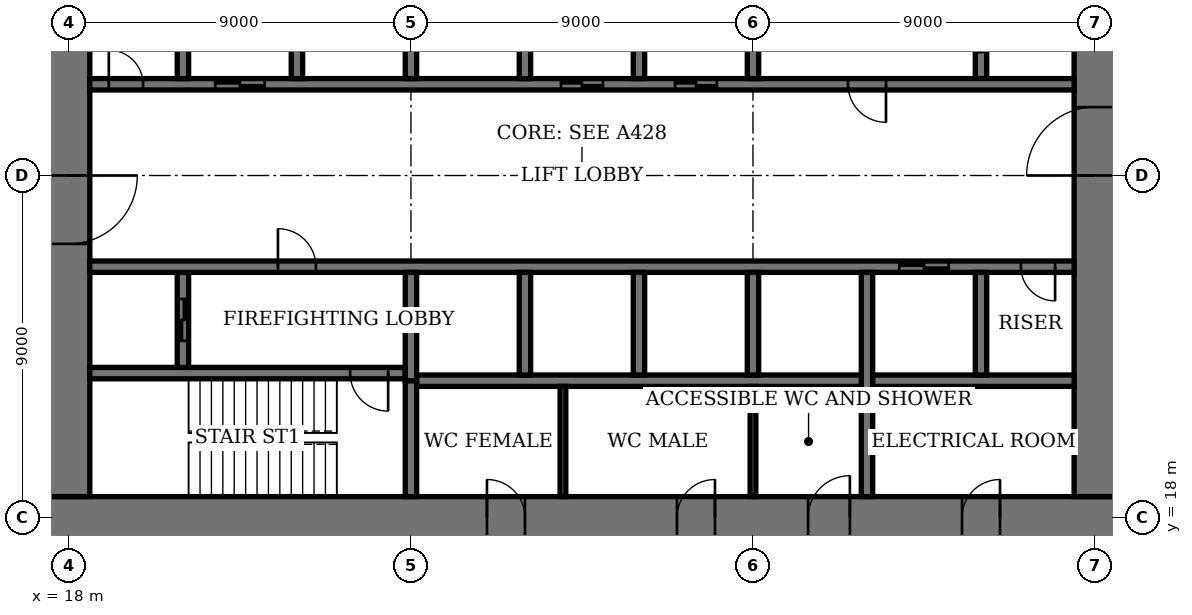
"""IFC4 building model, lengths in metres.
Left out: names, types, materials, properties, quantities, classifications, styles, units other than length and angle.
Written with IfcOpenShell. Run it as: python <this file> out.ifc"""

import sys

from ifc_helpers import new_model, si_unit, direction, frame, frame_2d, origin, place, context, subcontext, project, spatial, rectangle, extrude, element, fill, save


model = new_model("IFC4")
c1 = context("Model", 3, precision=1e-05, world=origin(), true_north=direction((0.0, 1.0)))
c2 = subcontext(c1, "Body", "Model", "MODEL_VIEW")
j1 = project(units=[si_unit("LENGTHUNIT", "METRE"), si_unit("PLANEANGLEUNIT", "RADIAN")], contexts=[c1])
p1 = place(None, origin())
s1 = spatial("IfcSite", under=j1, at=p1, CompositionType="ELEMENT")
p2 = place(p1, origin())
s2 = spatial("IfcBuilding", under=s1, at=p2, CompositionType="ELEMENT")
p3 = place(p2, frame((0.0, 0.0, 89.0)))
s3 = spatial("IfcBuildingStorey", under=s2, at=p3, CompositionType="ELEMENT", Elevation=89.0)
p4 = place(p3, frame((17.45, 18.0, 0.0), z_axis=(0.0, 0.0, 1.0), x_axis=(1.0, 0.0, 0.0)))
e1 = element("IfcWall", 1, at=p4, inside=s3, PredefinedType="SHEAR", context=c2, shape_type="SweptSolid", body=[
    extrude(rectangle(XDim=28.1, YDim=1.1, at=frame_2d((14.05, 0.0))), origin(), (0.0, 0.0, 1.0), 4.0),
])
p5 = place(p4, frame((11.55, 0.0, 0.0)))
e2 = element("IfcOpeningElement", 2, at=p5, cuts=e1, PredefinedType="OPENING", context=c2, shape_type="SweptSolid", body=[
    extrude(rectangle(XDim=1.0, YDim=2.4, at=frame_2d((0.5, 1.2))), frame((0.0, 0.56, 0.0), z_axis=(0.0, -1.0, 0.0), x_axis=(1.0, 0.0, 0.0)), (0.0, 0.0, 1.0), 1.12),
])
p6 = place(p4, frame((16.55, 0.0, 0.0)))
e3 = element("IfcOpeningElement", 3, at=p6, cuts=e1, PredefinedType="OPENING", context=c2, shape_type="SweptSolid", body=[
    extrude(rectangle(XDim=1.0, YDim=2.4, at=frame_2d((0.5, 1.2))), frame((0.0, 0.56, 0.0), z_axis=(0.0, -1.0, 0.0), x_axis=(1.0, 0.0, 0.0)), (0.0, 0.0, 1.0), 1.12),
])
p7 = place(p4, frame((20.0, 0.0, 0.0)))
e4 = element("IfcOpeningElement", 4, at=p7, cuts=e1, PredefinedType="OPENING", context=c2, shape_type="SweptSolid", body=[
    extrude(rectangle(XDim=1.1, YDim=2.4, at=frame_2d((0.55, 1.2))), frame((0.0, 0.56, 0.0), z_axis=(0.0, -1.0, 0.0), x_axis=(1.0, 0.0, 0.0)), (0.0, 0.0, 1.0), 1.12),
])
p8 = place(p4, frame((24.05, 0.0, 0.0)))
e5 = element("IfcOpeningElement", 5, at=p8, cuts=e1, PredefinedType="OPENING", context=c2, shape_type="SweptSolid", body=[
    extrude(rectangle(XDim=1.0, YDim=2.4, at=frame_2d((0.5, 1.2))), frame((0.0, 0.56, 0.0), z_axis=(0.0, -1.0, 0.0), x_axis=(1.0, 0.0, 0.0)), (0.0, 0.0, 1.0), 1.12),
])
p9 = place(p3, frame((18.0, 35.45, 0.0), z_axis=(0.0, 0.0, 1.0), x_axis=(0.0, -1.0, 0.0)))
e6 = element("IfcWall", 6, at=p9, inside=s3, PredefinedType="SHEAR", context=c2, shape_type="SweptSolid", body=[
    extrude(rectangle(XDim=16.9, YDim=1.1, at=frame_2d((8.45, 0.0))), origin(), (0.0, 0.0, 1.0), 4.0),
])
p10 = place(p9, frame((8.45, 0.0, 0.0)))
e7 = element("IfcOpeningElement", 7, at=p10, cuts=e6, PredefinedType="OPENING", context=c2, shape_type="SweptSolid", body=[
    extrude(rectangle(XDim=1.8, YDim=2.4, at=frame_2d((0.9, 1.2))), frame((0.0, 0.56, 0.0), z_axis=(0.0, -1.0, 0.0), x_axis=(1.0, 0.0, 0.0)), (0.0, 0.0, 1.0), 1.12),
])
p11 = place(p3, frame((45.0, 18.55, 0.0), z_axis=(0.0, 0.0, 1.0), x_axis=(0.0, 1.0, 0.0)))
e8 = element("IfcWall", 8, at=p11, inside=s3, PredefinedType="SHEAR", context=c2, shape_type="SweptSolid", body=[
    extrude(rectangle(XDim=16.9, YDim=1.1, at=frame_2d((8.45, 0.0))), origin(), (0.0, 0.0, 1.0), 4.0),
])
p12 = place(p11, frame((8.45, 0.0, 0.0)))
e9 = element("IfcOpeningElement", 9, at=p12, cuts=e8, PredefinedType="OPENING", context=c2, shape_type="SweptSolid", body=[
    extrude(rectangle(XDim=1.8, YDim=2.4, at=frame_2d((0.9, 1.2))), frame((0.0, 0.56, 0.0), z_axis=(0.0, -1.0, 0.0), x_axis=(1.0, 0.0, 0.0)), (0.0, 0.0, 1.0), 1.12),
])
p13 = place(p3, frame((18.55, 21.8, 0.0), z_axis=(0.0, 0.0, 1.0), x_axis=(1.0, 0.0, 0.0)))
e10 = element("IfcWall", 10, at=p13, inside=s3, PredefinedType="SHEAR", context=c2, shape_type="SweptSolid", body=[
    extrude(rectangle(XDim=8.3, YDim=0.3, at=frame_2d((4.15, 0.0))), origin(), (0.0, 0.0, 1.0), 4.0),
])
p14 = place(p13, frame((6.85, 0.0, 0.0)))
e11 = element("IfcOpeningElement", 11, at=p14, cuts=e10, PredefinedType="OPENING", context=c2, shape_type="SweptSolid", body=[
    extrude(rectangle(XDim=1.0, YDim=2.4, at=frame_2d((0.5, 1.2))), frame((0.0, 0.16, 0.0), z_axis=(0.0, -1.0, 0.0), x_axis=(1.0, 0.0, 0.0)), (0.0, 0.0, 1.0), 0.32),
])
p15 = place(p3, frame((27.0, 18.55, 0.0), z_axis=(0.0, 0.0, 1.0), x_axis=(0.0, 1.0, 0.0)))
e12 = element("IfcWall", 12, at=p15, inside=s3, PredefinedType="SHEAR", context=c2, shape_type="SweptSolid", body=[
    extrude(rectangle(XDim=3.05, YDim=0.3, at=frame_2d((1.525, 0.0))), origin(), (0.0, 0.0, 1.0), 4.0),
])
p16 = place(p3, frame((21.0, 21.95, 0.0), z_axis=(0.0, 0.0, 1.0), x_axis=(0.0, 1.0, 0.0)))
e13 = element("IfcWall", 13, at=p16, inside=s3, PredefinedType="SHEAR", context=c2, shape_type="SweptSolid", body=[
    extrude(rectangle(XDim=2.5, YDim=0.3, at=frame_2d((1.25, 0.0))), origin(), (0.0, 0.0, 1.0), 4.0),
])
p17 = place(p16, frame((0.7, 0.0, 0.0)))
e14 = element("IfcOpeningElement", 14, at=p17, cuts=e13, PredefinedType="OPENING", context=c2, shape_type="SweptSolid", body=[
    extrude(rectangle(XDim=1.1, YDim=2.4, at=frame_2d((0.55, 1.2))), frame((0.0, 0.16, 0.0), z_axis=(0.0, -1.0, 0.0), x_axis=(1.0, 0.0, 0.0)), (0.0, 0.0, 1.0), 0.32),
])
p18 = place(p3, frame((42.0, 29.55, 0.0), z_axis=(0.0, 0.0, 1.0), x_axis=(0.0, 1.0, 0.0)))
e15 = element("IfcWall", 15, at=p18, inside=s3, PredefinedType="SHEAR", context=c2, shape_type="SweptSolid", body=[
    extrude(rectangle(XDim=2.5, YDim=0.3, at=frame_2d((1.25, 0.0))), origin(), (0.0, 0.0, 1.0), 4.0),
])
p19 = place(p18, frame((0.7, 0.0, 0.0)))
e16 = element("IfcOpeningElement", 16, at=p19, cuts=e15, PredefinedType="OPENING", context=c2, shape_type="SweptSolid", body=[
    extrude(rectangle(XDim=1.1, YDim=2.4, at=frame_2d((0.55, 1.2))), frame((0.0, 0.16, 0.0), z_axis=(0.0, -1.0, 0.0), x_axis=(1.0, 0.0, 0.0)), (0.0, 0.0, 1.0), 0.32),
])
p20 = place(p3, frame((18.55, 24.6, 0.0), z_axis=(0.0, 0.0, 1.0), x_axis=(1.0, 0.0, 0.0)))
e17 = element("IfcWall", 17, at=p20, inside=s3, PredefinedType="SHEAR", context=c2, shape_type="SweptSolid", body=[
    extrude(rectangle(XDim=25.9, YDim=0.3, at=frame_2d((12.95, 0.0))), origin(), (0.0, 0.0, 1.0), 4.0),
])
p21 = place(p20, frame((4.95, 0.0, 0.0)))
e18 = element("IfcOpeningElement", 18, at=p21, cuts=e17, PredefinedType="OPENING", context=c2, shape_type="SweptSolid", body=[
    extrude(rectangle(XDim=1.0, YDim=2.4, at=frame_2d((0.5, 1.2))), frame((0.0, 0.16, 0.0), z_axis=(0.0, -1.0, 0.0), x_axis=(1.0, 0.0, 0.0)), (0.0, 0.0, 1.0), 0.32),
])
p22 = place(p20, frame((24.5, 0.0, 0.0)))
e19 = element("IfcOpeningElement", 19, at=p22, cuts=e17, PredefinedType="OPENING", context=c2, shape_type="SweptSolid", body=[
    extrude(rectangle(XDim=0.9, YDim=2.1, at=frame_2d((0.45, 1.05))), frame((0.0, 0.16, 0.0), z_axis=(0.0, -1.0, 0.0), x_axis=(1.0, 0.0, 0.0)), (0.0, 0.0, 1.0), 0.32),
])
p23 = place(p20, frame((21.3, 0.0, 0.0)))
e20 = element("IfcOpeningElement", 20, at=p23, cuts=e17, PredefinedType="OPENING", context=c2, shape_type="SweptSolid", body=[
    extrude(rectangle(XDim=1.3, YDim=2.4, at=frame_2d((0.65, 1.2))), frame((0.0, 0.16, 0.0), z_axis=(0.0, -1.0, 0.0), x_axis=(1.0, 0.0, 0.0)), (0.0, 0.0, 1.0), 0.32),
])
p24 = place(p3, frame((18.55, 29.4, 0.0), z_axis=(0.0, 0.0, 1.0), x_axis=(1.0, 0.0, 0.0)))
e21 = element("IfcWall", 21, at=p24, inside=s3, PredefinedType="SHEAR", context=c2, shape_type="SweptSolid", body=[
    extrude(rectangle(XDim=25.9, YDim=0.3, at=frame_2d((12.95, 0.0))), origin(), (0.0, 0.0, 1.0), 4.0),
])
p25 = place(p24, frame((19.95, 0.0, 0.0)))
e22 = element("IfcOpeningElement", 22, at=p25, cuts=e21, PredefinedType="OPENING", context=c2, shape_type="SweptSolid", body=[
    extrude(rectangle(XDim=1.0, YDim=2.4, at=frame_2d((0.5, 1.2))), frame((0.0, 0.16, 0.0), z_axis=(0.0, -1.0, 0.0), x_axis=(1.0, 0.0, 0.0)), (0.0, 0.0, 1.0), 0.32),
])
p26 = place(p24, frame((0.5, 0.0, 0.0)))
e23 = element("IfcOpeningElement", 23, at=p26, cuts=e21, PredefinedType="OPENING", context=c2, shape_type="SweptSolid", body=[
    extrude(rectangle(XDim=0.9, YDim=2.1, at=frame_2d((0.45, 1.05))), frame((0.0, 0.16, 0.0), z_axis=(0.0, -1.0, 0.0), x_axis=(1.0, 0.0, 0.0)), (0.0, 0.0, 1.0), 0.32),
])
p27 = place(p24, frame((15.4, 0.0, 0.0)))
e24 = element("IfcOpeningElement", 24, at=p27, cuts=e21, PredefinedType="OPENING", context=c2, shape_type="SweptSolid", body=[
    extrude(rectangle(XDim=1.1, YDim=2.4, at=frame_2d((0.55, 1.2))), frame((0.0, 0.16, 0.0), z_axis=(0.0, -1.0, 0.0), x_axis=(1.0, 0.0, 0.0)), (0.0, 0.0, 1.0), 0.32),
])
p28 = place(p24, frame((12.4, 0.0, 0.0)))
e25 = element("IfcOpeningElement", 25, at=p28, cuts=e21, PredefinedType="OPENING", context=c2, shape_type="SweptSolid", body=[
    extrude(rectangle(XDim=1.1, YDim=2.4, at=frame_2d((0.55, 1.2))), frame((0.0, 0.16, 0.0), z_axis=(0.0, -1.0, 0.0), x_axis=(1.0, 0.0, 0.0)), (0.0, 0.0, 1.0), 0.32),
])
p29 = place(p24, frame((3.3, 0.0, 0.0)))
e26 = element("IfcOpeningElement", 26, at=p29, cuts=e21, PredefinedType="OPENING", context=c2, shape_type="SweptSolid", body=[
    extrude(rectangle(XDim=1.3, YDim=2.4, at=frame_2d((0.65, 1.2))), frame((0.0, 0.16, 0.0), z_axis=(0.0, -1.0, 0.0), x_axis=(1.0, 0.0, 0.0)), (0.0, 0.0, 1.0), 0.32),
])
p30 = place(p3, frame((27.15, 21.6, 0.0), z_axis=(0.0, 0.0, 1.0), x_axis=(1.0, 0.0, 0.0)))
e27 = element("IfcWall", 27, at=p30, inside=s3, PredefinedType="SHEAR", context=c2, shape_type="SweptSolid", body=[
    extrude(rectangle(XDim=17.3, YDim=0.3, at=frame_2d((8.65, 0.0))), origin(), (0.0, 0.0, 1.0), 4.0),
])
for number, where, z_axis, x_axis in (
    (28, (30.0, 21.75, 0.0), (0.0, 0.0, 1.0), (0.0, 1.0, 0.0)),
    (29, (33.0, 29.55, 0.0), (0.0, 0.0, 1.0), (0.0, 1.0, 0.0)),
    (30, (33.0, 21.75, 0.0), (0.0, 0.0, 1.0), (0.0, 1.0, 0.0)),
    (31, (30.0, 29.55, 0.0), (0.0, 0.0, 1.0), (0.0, 1.0, 0.0)),
    (32, (36.0, 21.75, 0.0), (0.0, 0.0, 1.0), (0.0, 1.0, 0.0)),
    (33, (27.0, 29.55, 0.0), (0.0, 0.0, 1.0), (0.0, 1.0, 0.0)),
):
    element("IfcWall", number, at=place(p3, frame(where, z_axis=z_axis, x_axis=x_axis)), inside=s3, PredefinedType="SHEAR", context=c2, shape_type="SweptSolid", body=[
        extrude(rectangle(XDim=2.7, YDim=0.3, at=frame_2d((1.35, 0.0))), origin(), (0.0, 0.0, 1.0), 4.0),
    ])
for number, where, z_axis, x_axis in (
    (34, (39.0, 18.55, 0.0), (0.0, 0.0, 1.0), (0.0, 1.0, 0.0)),
    (35, (24.0, 29.55, 0.0), (0.0, 0.0, 1.0), (0.0, 1.0, 0.0)),
):
    element("IfcWall", number, at=place(p3, frame(where, z_axis=z_axis, x_axis=x_axis)), inside=s3, PredefinedType="SHEAR", context=c2, shape_type="SweptSolid", body=[
        extrude(rectangle(XDim=5.9, YDim=0.3, at=frame_2d((2.95, 0.0))), origin(), (0.0, 0.0, 1.0), 4.0),
    ])
for number, where, z_axis, x_axis in (
    (36, (42.0, 21.75, 0.0), (0.0, 0.0, 1.0), (0.0, 1.0, 0.0)),
    (37, (21.0, 29.55, 0.0), (0.0, 0.0, 1.0), (0.0, 1.0, 0.0)),
):
    element("IfcWall", number, at=place(p3, frame(where, z_axis=z_axis, x_axis=x_axis)), inside=s3, PredefinedType="SHEAR", context=c2, shape_type="SweptSolid", body=[
        extrude(rectangle(XDim=2.7, YDim=0.3, at=frame_2d((1.35, 0.0))), origin(), (0.0, 0.0, 1.0), 4.0),
    ])
for number, where, z_axis, x_axis in (
    (38, (27.0, 21.6, 0.0), (0.0, 0.0, 1.0), (0.0, 1.0, 0.0)),
    (39, (36.0, 29.55, 0.0), (0.0, 0.0, 1.0), (0.0, 1.0, 0.0)),
):
    element("IfcWall", number, at=place(p3, frame(where, z_axis=z_axis, x_axis=x_axis)), inside=s3, PredefinedType="SHEAR", context=c2, shape_type="SweptSolid", body=[
        extrude(rectangle(XDim=2.85, YDim=0.3, at=frame_2d((1.425, 0.0))), origin(), (0.0, 0.0, 1.0), 4.0),
    ])
for number, where, z_axis, x_axis in (
    (40, (31.0, 18.55, 0.0), (0.0, 0.0, 1.0), (0.0, 1.0, 0.0)),
    (41, (36.0, 18.55, 0.0), (0.0, 0.0, 1.0), (0.0, 1.0, 0.0)),
):
    element("IfcWall", number, at=place(p3, frame(where, z_axis=z_axis, x_axis=x_axis)), inside=s3, PredefinedType="PARTITIONING", context=c2, shape_type="SweptSolid", body=[
        extrude(rectangle(XDim=2.9, YDim=0.15, at=frame_2d((1.45, 0.0))), origin(), (0.0, 0.0, 1.0), 3.75),
    ])
p31 = place(p10, origin())
e42 = element("IfcDoor", 42, at=p31, inside=s3, OperationType="DOUBLE_DOOR_DOUBLE_SWING", PredefinedType="DOOR", context=c2, shape_type="SweptSolid", body=[
    extrude(rectangle(XDim=1.8, YDim=2.4, at=frame_2d((0.9, 1.2))), frame((0.0, 0.03, 0.0), z_axis=(0.0, -1.0, 0.0), x_axis=(1.0, 0.0, 0.0)), (0.0, 0.0, 1.0), 0.06),
    extrude(rectangle(XDim=0.04, YDim=2.4, at=frame_2d((0.02, 1.2))), frame((0.0, 0.55, 0.0), z_axis=(0.0, -1.0, 0.0), x_axis=(1.0, 0.0, 0.0)), (0.0, 0.0, 1.0), 1.1),
    extrude(rectangle(XDim=0.04, YDim=2.4, at=frame_2d((1.78, 1.2))), frame((0.0, 0.55, 0.0), z_axis=(0.0, -1.0, 0.0), x_axis=(1.0, 0.0, 0.0)), (0.0, 0.0, 1.0), 1.1),
    extrude(rectangle(XDim=1.8, YDim=0.04, at=frame_2d((0.9, 2.38))), frame((0.0, 0.55, 0.0), z_axis=(0.0, -1.0, 0.0), x_axis=(1.0, 0.0, 0.0)), (0.0, 0.0, 1.0), 1.1),
])
fill(e7, e42)
p32 = place(p12, origin())
e43 = element("IfcDoor", 43, at=p32, inside=s3, OperationType="DOUBLE_DOOR_DOUBLE_SWING", PredefinedType="DOOR", context=c2, shape_type="SweptSolid", body=[
    extrude(rectangle(XDim=1.8, YDim=2.4, at=frame_2d((0.9, 1.2))), frame((0.0, 0.03, 0.0), z_axis=(0.0, -1.0, 0.0), x_axis=(1.0, 0.0, 0.0)), (0.0, 0.0, 1.0), 0.06),
    extrude(rectangle(XDim=0.04, YDim=2.4, at=frame_2d((0.02, 1.2))), frame((0.0, 0.55, 0.0), z_axis=(0.0, -1.0, 0.0), x_axis=(1.0, 0.0, 0.0)), (0.0, 0.0, 1.0), 1.1),
    extrude(rectangle(XDim=0.04, YDim=2.4, at=frame_2d((1.78, 1.2))), frame((0.0, 0.55, 0.0), z_axis=(0.0, -1.0, 0.0), x_axis=(1.0, 0.0, 0.0)), (0.0, 0.0, 1.0), 1.1),
    extrude(rectangle(XDim=1.8, YDim=0.04, at=frame_2d((0.9, 2.38))), frame((0.0, 0.55, 0.0), z_axis=(0.0, -1.0, 0.0), x_axis=(1.0, 0.0, 0.0)), (0.0, 0.0, 1.0), 1.1),
])
fill(e9, e43)
p33 = place(p5, origin())
e44 = element("IfcDoor", 44, at=p33, inside=s3, OperationType="SINGLE_SWING_RIGHT", PredefinedType="DOOR", context=c2, shape_type="SweptSolid", body=[
    extrude(rectangle(XDim=1.0, YDim=2.4, at=frame_2d((0.5, 1.2))), frame((0.0, 0.025, 0.0), z_axis=(0.0, -1.0, 0.0), x_axis=(1.0, 0.0, 0.0)), (0.0, 0.0, 1.0), 0.05),
    extrude(rectangle(XDim=0.04, YDim=2.4, at=frame_2d((0.02, 1.2))), frame((0.0, 0.4, 0.0), z_axis=(0.0, -1.0, 0.0), x_axis=(1.0, 0.0, 0.0)), (0.0, 0.0, 1.0), 0.8),
    extrude(rectangle(XDim=0.04, YDim=2.4, at=frame_2d((0.98, 1.2))), frame((0.0, 0.4, 0.0), z_axis=(0.0, -1.0, 0.0), x_axis=(1.0, 0.0, 0.0)), (0.0, 0.0, 1.0), 0.8),
    extrude(rectangle(XDim=1.0, YDim=0.04, at=frame_2d((0.5, 2.38))), frame((0.0, 0.4, 0.0), z_axis=(0.0, -1.0, 0.0), x_axis=(1.0, 0.0, 0.0)), (0.0, 0.0, 1.0), 0.8),
])
fill(e2, e44)
p34 = place(p6, origin())
e45 = element("IfcDoor", 45, at=p34, inside=s3, OperationType="SINGLE_SWING_LEFT", PredefinedType="DOOR", context=c2, shape_type="SweptSolid", body=[
    extrude(rectangle(XDim=1.0, YDim=2.4, at=frame_2d((0.5, 1.2))), frame((0.0, 0.025, 0.0), z_axis=(0.0, -1.0, 0.0), x_axis=(1.0, 0.0, 0.0)), (0.0, 0.0, 1.0), 0.05),
    extrude(rectangle(XDim=0.04, YDim=2.4, at=frame_2d((0.02, 1.2))), frame((0.0, 0.4, 0.0), z_axis=(0.0, -1.0, 0.0), x_axis=(1.0, 0.0, 0.0)), (0.0, 0.0, 1.0), 0.8),
    extrude(rectangle(XDim=0.04, YDim=2.4, at=frame_2d((0.98, 1.2))), frame((0.0, 0.4, 0.0), z_axis=(0.0, -1.0, 0.0), x_axis=(1.0, 0.0, 0.0)), (0.0, 0.0, 1.0), 0.8),
    extrude(rectangle(XDim=1.0, YDim=0.04, at=frame_2d((0.5, 2.38))), frame((0.0, 0.4, 0.0), z_axis=(0.0, -1.0, 0.0), x_axis=(1.0, 0.0, 0.0)), (0.0, 0.0, 1.0), 0.8),
])
fill(e3, e45)
p35 = place(p7, origin())
e46 = element("IfcDoor", 46, at=p35, inside=s3, OperationType="SINGLE_SWING_LEFT", PredefinedType="DOOR", context=c2, shape_type="SweptSolid", body=[
    extrude(rectangle(XDim=1.1, YDim=2.4, at=frame_2d((0.55, 1.2))), frame((0.0, 0.025, 0.0), z_axis=(0.0, -1.0, 0.0), x_axis=(1.0, 0.0, 0.0)), (0.0, 0.0, 1.0), 0.05),
    extrude(rectangle(XDim=0.04, YDim=2.4, at=frame_2d((0.02, 1.2))), frame((0.0, 0.44, 0.0), z_axis=(0.0, -1.0, 0.0), x_axis=(1.0, 0.0, 0.0)), (0.0, 0.0, 1.0), 0.88),
    extrude(rectangle(XDim=0.04, YDim=2.4, at=frame_2d((1.08, 1.2))), frame((0.0, 0.44, 0.0), z_axis=(0.0, -1.0, 0.0), x_axis=(1.0, 0.0, 0.0)), (0.0, 0.0, 1.0), 0.88),
    extrude(rectangle(XDim=1.1, YDim=0.04, at=frame_2d((0.55, 2.38))), frame((0.0, 0.44, 0.0), z_axis=(0.0, -1.0, 0.0), x_axis=(1.0, 0.0, 0.0)), (0.0, 0.0, 1.0), 0.88),
])
fill(e4, e46)
p36 = place(p8, origin())
e47 = element("IfcDoor", 47, at=p36, inside=s3, OperationType="SINGLE_SWING_LEFT", PredefinedType="DOOR", context=c2, shape_type="SweptSolid", body=[
    extrude(rectangle(XDim=1.0, YDim=2.4, at=frame_2d((0.5, 1.2))), frame((0.0, 0.025, 0.0), z_axis=(0.0, -1.0, 0.0), x_axis=(1.0, 0.0, 0.0)), (0.0, 0.0, 1.0), 0.05),
    extrude(rectangle(XDim=0.04, YDim=2.4, at=frame_2d((0.02, 1.2))), frame((0.0, 0.4, 0.0), z_axis=(0.0, -1.0, 0.0), x_axis=(1.0, 0.0, 0.0)), (0.0, 0.0, 1.0), 0.8),
    extrude(rectangle(XDim=0.04, YDim=2.4, at=frame_2d((0.98, 1.2))), frame((0.0, 0.4, 0.0), z_axis=(0.0, -1.0, 0.0), x_axis=(1.0, 0.0, 0.0)), (0.0, 0.0, 1.0), 0.8),
    extrude(rectangle(XDim=1.0, YDim=0.04, at=frame_2d((0.5, 2.38))), frame((0.0, 0.4, 0.0), z_axis=(0.0, -1.0, 0.0), x_axis=(1.0, 0.0, 0.0)), (0.0, 0.0, 1.0), 0.8),
])
fill(e5, e47)
p37 = place(p14, origin())
e48 = element("IfcDoor", 48, at=p37, inside=s3, OperationType="SINGLE_SWING_RIGHT", PredefinedType="DOOR", context=c2, shape_type="SweptSolid", body=[
    extrude(rectangle(XDim=1.0, YDim=2.4, at=frame_2d((0.5, 1.2))), frame((0.0, 0.03, 0.0), z_axis=(0.0, -1.0, 0.0), x_axis=(1.0, 0.0, 0.0)), (0.0, 0.0, 1.0), 0.06),
])
fill(e11, e48)
p38 = place(p21, origin())
e49 = element("IfcDoor", 49, at=p38, inside=s3, OperationType="SINGLE_SWING_RIGHT", PredefinedType="DOOR", context=c2, shape_type="SweptSolid", body=[
    extrude(rectangle(XDim=1.0, YDim=2.4, at=frame_2d((0.5, 1.2))), frame((0.0, 0.03, 0.0), z_axis=(0.0, -1.0, 0.0), x_axis=(1.0, 0.0, 0.0)), (0.0, 0.0, 1.0), 0.06),
])
fill(e18, e49)
p39 = place(p25, origin())
e50 = element("IfcDoor", 50, at=p39, inside=s3, OperationType="SINGLE_SWING_RIGHT", PredefinedType="DOOR", context=c2, shape_type="SweptSolid", body=[
    extrude(rectangle(XDim=1.0, YDim=2.4, at=frame_2d((0.5, 1.2))), frame((0.0, 0.03, 0.0), z_axis=(0.0, -1.0, 0.0), x_axis=(1.0, 0.0, 0.0)), (0.0, 0.0, 1.0), 0.06),
])
fill(e22, e50)
p40 = place(p22, origin())
e51 = element("IfcDoor", 51, at=p40, inside=s3, OperationType="SINGLE_SWING_RIGHT", PredefinedType="DOOR", context=c2, shape_type="SweptSolid", body=[
    extrude(rectangle(XDim=0.9, YDim=2.1, at=frame_2d((0.45, 1.05))), frame((0.0, 0.03, 0.0), z_axis=(0.0, -1.0, 0.0), x_axis=(1.0, 0.0, 0.0)), (0.0, 0.0, 1.0), 0.06),
])
fill(e19, e51)
p41 = place(p26, origin())
e52 = element("IfcDoor", 52, at=p41, inside=s3, OperationType="SINGLE_SWING_RIGHT", PredefinedType="DOOR", context=c2, shape_type="SweptSolid", body=[
    extrude(rectangle(XDim=0.9, YDim=2.1, at=frame_2d((0.45, 1.05))), frame((0.0, 0.03, 0.0), z_axis=(0.0, -1.0, 0.0), x_axis=(1.0, 0.0, 0.0)), (0.0, 0.0, 1.0), 0.06),
])
fill(e23, e52)
p42 = place(p27, origin())
e53 = element("IfcDoor", 53, at=p42, inside=s3, OperationType="DOUBLE_DOOR_SLIDING", PredefinedType="DOOR", context=c2, shape_type="SweptSolid", body=[
    extrude(rectangle(XDim=1.1, YDim=2.4, at=frame_2d((0.55, 1.2))), frame((0.0, 0.02, 0.0), z_axis=(0.0, -1.0, 0.0), x_axis=(1.0, 0.0, 0.0)), (0.0, 0.0, 1.0), 0.04),
])
fill(e24, e53)
p43 = place(p28, origin())
e54 = element("IfcDoor", 54, at=p43, inside=s3, OperationType="DOUBLE_DOOR_SLIDING", PredefinedType="DOOR", context=c2, shape_type="SweptSolid", body=[
    extrude(rectangle(XDim=1.1, YDim=2.4, at=frame_2d((0.55, 1.2))), frame((0.0, 0.02, 0.0), z_axis=(0.0, -1.0, 0.0), x_axis=(1.0, 0.0, 0.0)), (0.0, 0.0, 1.0), 0.04),
])
fill(e25, e54)
p44 = place(p23, origin())
e55 = element("IfcDoor", 55, at=p44, inside=s3, OperationType="DOUBLE_DOOR_SLIDING", PredefinedType="DOOR", context=c2, shape_type="SweptSolid", body=[
    extrude(rectangle(XDim=1.3, YDim=2.4, at=frame_2d((0.65, 1.2))), frame((0.0, 0.02, 0.0), z_axis=(0.0, -1.0, 0.0), x_axis=(1.0, 0.0, 0.0)), (0.0, 0.0, 1.0), 0.04),
])
fill(e20, e55)
p45 = place(p29, origin())
e56 = element("IfcDoor", 56, at=p45, inside=s3, OperationType="DOUBLE_DOOR_SLIDING", PredefinedType="DOOR", context=c2, shape_type="SweptSolid", body=[
    extrude(rectangle(XDim=1.3, YDim=2.4, at=frame_2d((0.65, 1.2))), frame((0.0, 0.02, 0.0), z_axis=(0.0, -1.0, 0.0), x_axis=(1.0, 0.0, 0.0)), (0.0, 0.0, 1.0), 0.04),
])
fill(e26, e56)
p46 = place(p17, origin())
e57 = element("IfcDoor", 57, at=p46, inside=s3, OperationType="DOUBLE_DOOR_SLIDING", PredefinedType="DOOR", context=c2, shape_type="SweptSolid", body=[
    extrude(rectangle(XDim=1.1, YDim=2.4, at=frame_2d((0.55, 1.2))), frame((0.0, 0.03, 0.0), z_axis=(0.0, -1.0, 0.0), x_axis=(1.0, 0.0, 0.0)), (0.0, 0.0, 1.0), 0.06),
])
fill(e14, e57)
save(model, sys.argv[1])
